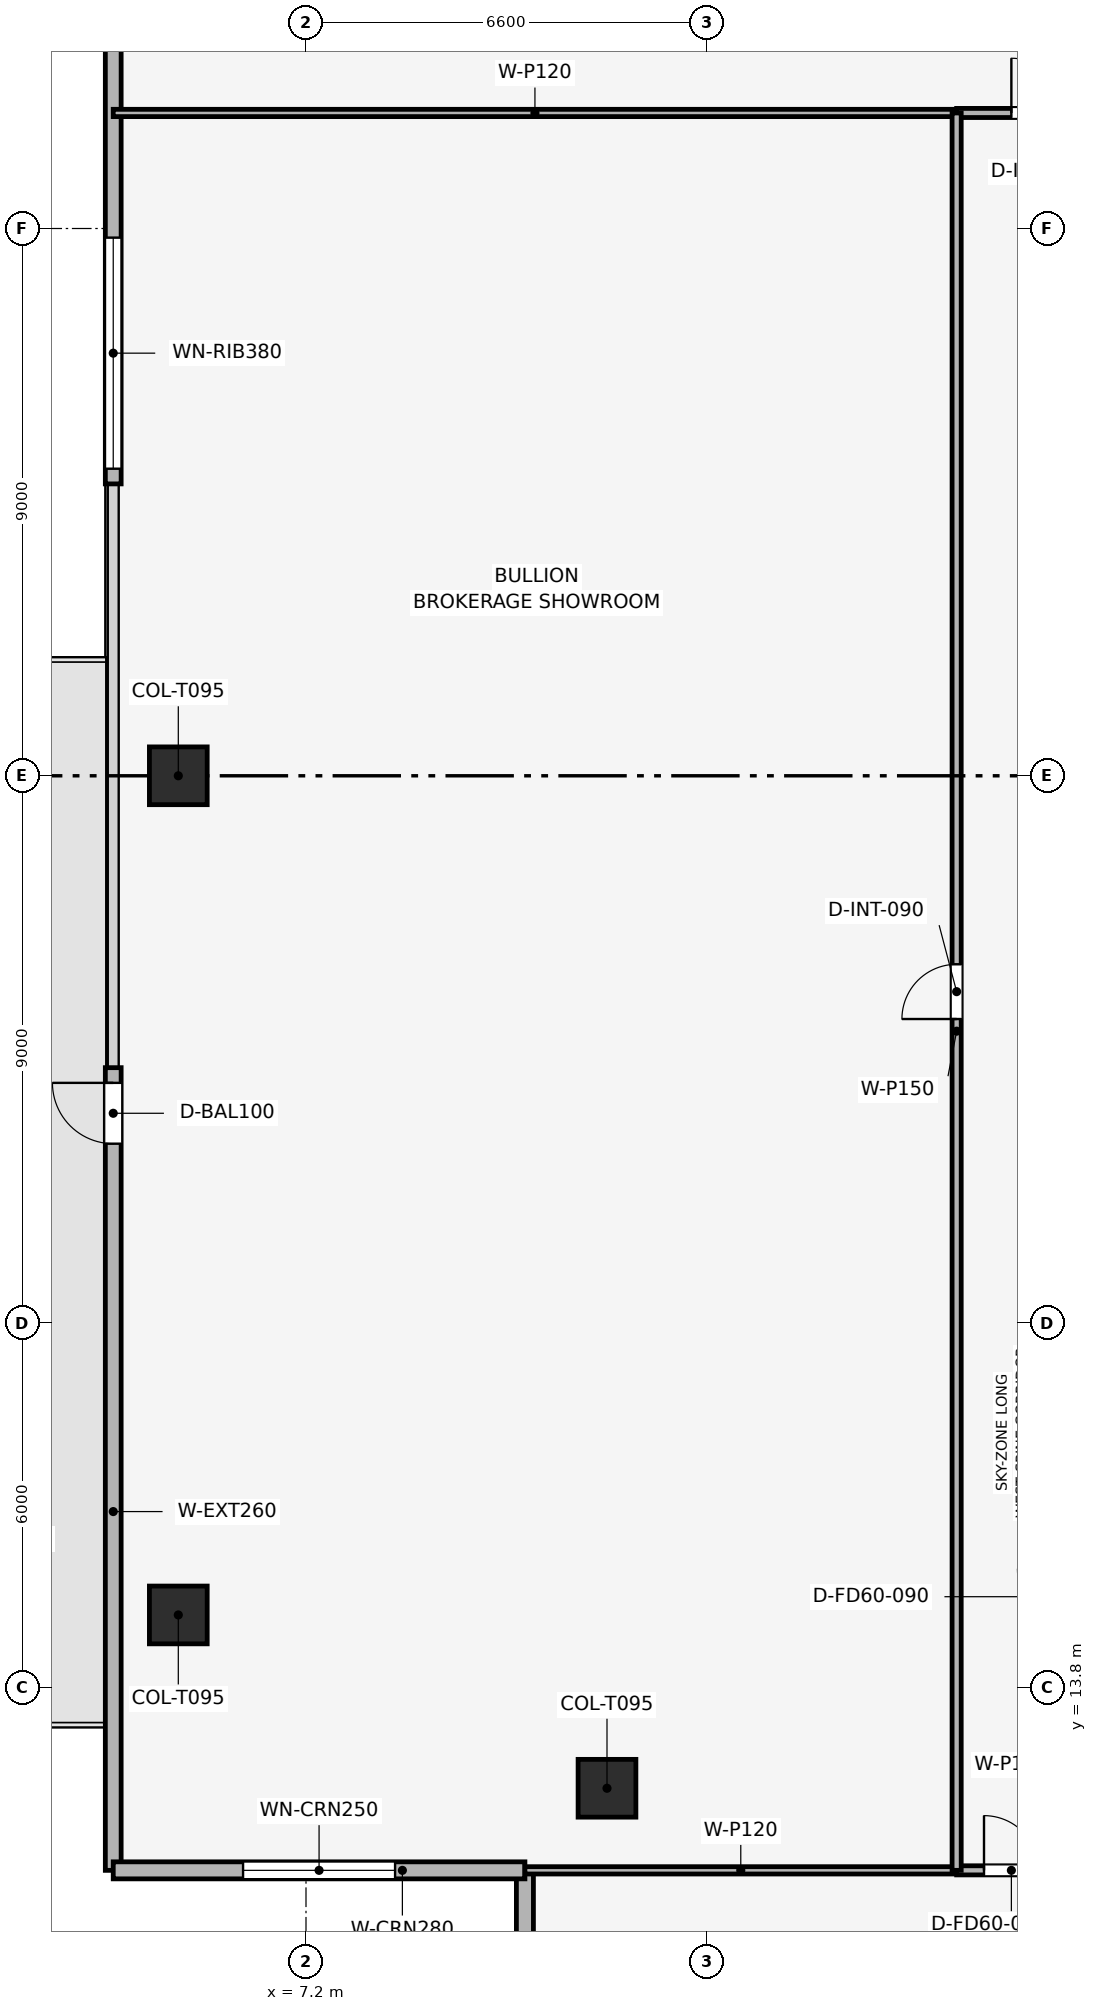
"""IFC4 building model, lengths in metres.
Left out: names, types, materials, properties, quantities, classifications, styles, units other than length and angle.
Written with IfcOpenShell. Run it as: python <this file> out.ifc"""

import sys

from ifc_helpers import new_model, si_unit, direction, frame, frame_2d, origin, origin_2d, place, context, subcontext, project, spatial, rectangle, extrude, element, fill, save


model = new_model("IFC4")
c1 = context("Model", 3, precision=1e-05, world=origin(), true_north=direction((0.0, 1.0)))
c2 = subcontext(c1, "Body", "Model", "MODEL_VIEW")
j1 = project(units=[si_unit("LENGTHUNIT", "METRE"), si_unit("PLANEANGLEUNIT", "RADIAN")], contexts=[c1])
p1 = place(None, origin())
s1 = spatial("IfcSite", under=j1, at=p1, CompositionType="ELEMENT")
p2 = place(p1, origin())
s2 = spatial("IfcBuilding", under=s1, at=p2, CompositionType="ELEMENT")
p3 = place(p2, frame((0.0, 0.0, 250.35)))
s3 = spatial("IfcBuildingStorey", under=s2, at=p3, CompositionType="ELEMENT", Elevation=250.35)
for number, where, z_axis, x_axis in (
    (1, (5.1, 28.8, 0.003), (0.0, 0.0, 1.0), (1.0, 0.0, 0.0)),
    (2, (5.1, 15.0, 0.003), (0.0, 0.0, 1.0), (1.0, 0.0, 0.0)),
    (3, (12.15, 12.15, 0.003), (0.0, 0.0, 1.0), (1.0, 0.0, 0.0)),
):
    element("IfcColumn", number, at=place(p3, frame(where, z_axis=z_axis, x_axis=x_axis)), inside=s3, PredefinedType="COLUMN", context=c2, shape_type="SweptSolid", body=[
        extrude(rectangle(XDim=0.95, YDim=0.95, at=origin_2d()), origin(), (0.0, 0.0, 1.0), 3.494),
    ])
p4 = place(p3, frame((4.03, 10.8, 0.0), z_axis=(0.0, 0.0, 1.0), x_axis=(0.0, 1.0, 0.0)))
e4 = element("IfcWall", 4, at=p4, inside=s3, PredefinedType="SOLIDWALL", context=c2, shape_type="SweptSolid", body=[
    extrude(rectangle(XDim=13.2, YDim=0.26, at=frame_2d((6.6, 0.0))), origin(), (0.0, 0.0, 1.0), 3.5),
])
p5 = place(p4, frame((11.95, 0.0, 0.0)))
e5 = element("IfcOpeningElement", 5, at=p5, cuts=e4, PredefinedType="OPENING", context=c2, shape_type="SweptSolid", body=[
    extrude(rectangle(XDim=1.0, YDim=2.2, at=frame_2d((0.5, 1.1))), frame((0.0, 0.14, 0.0), z_axis=(0.0, -1.0, 0.0), x_axis=(1.0, 0.0, 0.0)), (0.0, 0.0, 1.0), 0.28),
])
p6 = place(p3, frame((4.03, 33.6, 0.0), z_axis=(0.0, 0.0, 1.0), x_axis=(0.0, 1.0, 0.0)))
e6 = element("IfcWall", 6, at=p6, inside=s3, PredefinedType="SOLIDWALL", context=c2, shape_type="SweptSolid", body=[
    extrude(rectangle(XDim=13.2, YDim=0.26, at=frame_2d((6.6, 0.0))), origin(), (0.0, 0.0, 1.0), 3.5),
])
p7 = place(p6, frame((0.25, 0.0, 0.9)))
e7 = element("IfcOpeningElement", 7, at=p7, cuts=e6, PredefinedType="OPENING", context=c2, shape_type="SweptSolid", body=[
    extrude(rectangle(XDim=3.8, YDim=1.9, at=frame_2d((1.9, 0.95))), frame((0.0, 0.14, 0.0), z_axis=(0.0, -1.0, 0.0), x_axis=(1.0, 0.0, 0.0)), (0.0, 0.0, 1.0), 0.28),
])
p8 = place(p3, frame((10.8, 4.03, 0.0), z_axis=(0.0, 0.0, 1.0), x_axis=(0.0, 1.0, 0.0)))
e8 = element("IfcWall", 8, at=p8, inside=s3, PredefinedType="SOLIDWALL", context=c2, shape_type="SweptSolid", body=[
    extrude(rectangle(XDim=6.77, YDim=0.28, at=frame_2d((3.385, 0.0))), origin(), (0.0, 0.0, 1.0), 3.5),
])
p9 = place(p8, frame((2.135, 0.0, 0.9)))
e9 = element("IfcOpeningElement", 9, at=p9, cuts=e8, PredefinedType="OPENING", context=c2, shape_type="SweptSolid", body=[
    extrude(rectangle(XDim=2.5, YDim=1.9, at=frame_2d((1.25, 0.95))), frame((0.0, 0.15, 0.0), z_axis=(0.0, -1.0, 0.0), x_axis=(1.0, 0.0, 0.0)), (0.0, 0.0, 1.0), 0.3),
])
p10 = place(p3, frame((10.8, 10.8, 0.0), z_axis=(0.0, 0.0, 1.0), x_axis=(-1.0, 0.0, 0.0)))
e10 = element("IfcWall", 10, at=p10, inside=s3, PredefinedType="SOLIDWALL", context=c2, shape_type="SweptSolid", body=[
    extrude(rectangle(XDim=6.77, YDim=0.28, at=frame_2d((3.385, 0.0))), origin(), (0.0, 0.0, 1.0), 3.5),
])
p11 = place(p10, frame((2.135, 0.0, 0.9)))
e11 = element("IfcOpeningElement", 11, at=p11, cuts=e10, PredefinedType="OPENING", context=c2, shape_type="SweptSolid", body=[
    extrude(rectangle(XDim=2.5, YDim=1.9, at=frame_2d((1.25, 0.95))), frame((0.0, 0.15, 0.0), z_axis=(0.0, -1.0, 0.0), x_axis=(1.0, 0.0, 0.0)), (0.0, 0.0, 1.0), 0.3),
])
p12 = place(p3, frame((10.8, 10.8, 0.0), z_axis=(0.0, 0.0, 1.0), x_axis=(1.0, 0.0, 0.0)))
e12 = element("IfcWall", 12, at=p12, inside=s3, PredefinedType="PARTITIONING", context=c2, shape_type="SweptSolid", body=[
    extrude(rectangle(XDim=7.1, YDim=0.12, at=frame_2d((3.55, 0.0))), origin(), (0.0, 0.0, 1.0), 3.085),
])
p13 = place(p3, frame((17.9, 10.8, 0.0), z_axis=(0.0, 0.0, 1.0), x_axis=(1.0, 0.0, 0.0)))
e13 = element("IfcWall", 13, at=p13, inside=s3, PredefinedType="PARTITIONING", context=c2, shape_type="SweptSolid", body=[
    extrude(rectangle(XDim=1.9, YDim=0.15, at=frame_2d((0.95, 0.0))), origin(), (0.0, 0.0, 1.0), 3.5),
])
p14 = place(p13, frame((0.45, 0.0, 0.0)))
e14 = element("IfcOpeningElement", 14, at=p14, cuts=e13, PredefinedType="OPENING", context=c2, shape_type="SweptSolid", body=[
    extrude(rectangle(XDim=0.9, YDim=2.1, at=frame_2d((0.45, 1.05))), frame((0.0, 0.085, 0.0), z_axis=(0.0, -1.0, 0.0), x_axis=(1.0, 0.0, 0.0)), (0.0, 0.0, 1.0), 0.17),
])
p15 = place(p3, frame((4.03, 39.7, 0.0), z_axis=(0.0, 0.0, 1.0), x_axis=(1.0, 0.0, 0.0)))
e15 = element("IfcWall", 15, at=p15, inside=s3, PredefinedType="PARTITIONING", context=c2, shape_type="SweptSolid", body=[
    extrude(rectangle(XDim=13.87, YDim=0.12, at=frame_2d((6.935, 0.0))), origin(), (0.0, 0.0, 1.0), 3.085),
])
p16 = place(p3, frame((17.9, 39.7, 0.0), z_axis=(0.0, 0.0, 1.0), x_axis=(1.0, 0.0, 0.0)))
e16 = element("IfcWall", 16, at=p16, inside=s3, PredefinedType="PARTITIONING", context=c2, shape_type="SweptSolid", body=[
    extrude(rectangle(XDim=21.8, YDim=0.15, at=frame_2d((10.9, 0.0))), origin(), (0.0, 0.0, 1.0), 3.085),
])
p17 = place(p16, frame((0.9, 0.0, 0.0)))
e17 = element("IfcOpeningElement", 17, at=p17, cuts=e16, PredefinedType="OPENING", context=c2, shape_type="SweptSolid", body=[
    extrude(rectangle(XDim=0.9, YDim=2.1, at=frame_2d((0.45, 1.05))), frame((0.0, 0.085, 0.0), z_axis=(0.0, -1.0, 0.0), x_axis=(1.0, 0.0, 0.0)), (0.0, 0.0, 1.0), 0.17),
])
p18 = place(p16, frame((3.65, 0.0, 0.0)))
e18 = element("IfcOpeningElement", 18, at=p18, cuts=e16, PredefinedType="OPENING", context=c2, shape_type="SweptSolid", body=[
    extrude(rectangle(XDim=0.9, YDim=2.1, at=frame_2d((0.45, 1.05))), frame((0.0, 0.085, 0.0), z_axis=(0.0, -1.0, 0.0), x_axis=(1.0, 0.0, 0.0)), (0.0, 0.0, 1.0), 0.17),
])
p19 = place(p16, frame((6.55, 0.0, 0.0)))
e19 = element("IfcOpeningElement", 19, at=p19, cuts=e16, PredefinedType="OPENING", context=c2, shape_type="SweptSolid", body=[
    extrude(rectangle(XDim=0.9, YDim=2.1, at=frame_2d((0.45, 1.05))), frame((0.0, 0.085, 0.0), z_axis=(0.0, -1.0, 0.0), x_axis=(1.0, 0.0, 0.0)), (0.0, 0.0, 1.0), 0.17),
])
p20 = place(p16, frame((9.3, 0.0, 0.0)))
e20 = element("IfcOpeningElement", 20, at=p20, cuts=e16, PredefinedType="OPENING", context=c2, shape_type="SweptSolid", body=[
    extrude(rectangle(XDim=0.95, YDim=2.1, at=frame_2d((0.475, 1.05))), frame((0.0, 0.085, 0.0), z_axis=(0.0, -1.0, 0.0), x_axis=(1.0, 0.0, 0.0)), (0.0, 0.0, 1.0), 0.17),
])
p21 = place(p16, frame((16.0, 0.0, 0.0)))
e21 = element("IfcOpeningElement", 21, at=p21, cuts=e16, PredefinedType="OPENING", context=c2, shape_type="SweptSolid", body=[
    extrude(rectangle(XDim=0.9, YDim=2.1, at=frame_2d((0.45, 1.05))), frame((0.0, 0.085, 0.0), z_axis=(0.0, -1.0, 0.0), x_axis=(1.0, 0.0, 0.0)), (0.0, 0.0, 1.0), 0.17),
])
p22 = place(p3, frame((17.9, 10.8, 0.0), z_axis=(0.0, 0.0, 1.0), x_axis=(0.0, 1.0, 0.0)))
e22 = element("IfcWall", 22, at=p22, inside=s3, PredefinedType="PARTITIONING", context=c2, shape_type="SweptSolid", body=[
    extrude(rectangle(XDim=28.9, YDim=0.15, at=frame_2d((14.45, 0.0))), origin(), (0.0, 0.0, 1.0), 3.085),
])
p23 = place(p22, frame((14.0, 0.0, 0.0)))
e23 = element("IfcOpeningElement", 23, at=p23, cuts=e22, PredefinedType="OPENING", context=c2, shape_type="SweptSolid", body=[
    extrude(rectangle(XDim=0.9, YDim=2.1, at=frame_2d((0.45, 1.05))), frame((0.0, 0.085, 0.0), z_axis=(0.0, -1.0, 0.0), x_axis=(1.0, 0.0, 0.0)), (0.0, 0.0, 1.0), 0.17),
])
p24 = place(p5, origin())
e24 = element("IfcDoor", 24, at=p24, inside=s3, OperationType="SINGLE_SWING_RIGHT", PredefinedType="DOOR", context=c2, shape_type="SweptSolid", body=[
    extrude(rectangle(XDim=1.0, YDim=2.2, at=frame_2d((0.5, 1.1))), frame((0.0, 0.025, 0.0), z_axis=(0.0, -1.0, 0.0), x_axis=(1.0, 0.0, 0.0)), (0.0, 0.0, 1.0), 0.05),
])
fill(e5, e24)
p25 = place(p7, origin())
e25 = element("IfcWindow", 25, at=p25, inside=s3, PartitioningType="SINGLE_PANEL", PredefinedType="WINDOW", context=c2, shape_type="SweptSolid", body=[
    extrude(rectangle(XDim=3.8, YDim=1.9, at=frame_2d((1.9, 0.95))), frame((0.0, 0.03, 0.0), z_axis=(0.0, -1.0, 0.0), x_axis=(1.0, 0.0, 0.0)), (0.0, 0.0, 1.0), 0.06),
])
fill(e7, e25)
p26 = place(p11, origin())
e26 = element("IfcWindow", 26, at=p26, inside=s3, PartitioningType="SINGLE_PANEL", PredefinedType="WINDOW", context=c2, shape_type="SweptSolid", body=[
    extrude(rectangle(XDim=2.5, YDim=1.9, at=frame_2d((1.25, 0.95))), frame((0.0, 0.03, 0.0), z_axis=(0.0, -1.0, 0.0), x_axis=(1.0, 0.0, 0.0)), (0.0, 0.0, 1.0), 0.06),
])
fill(e11, e26)
p27 = place(p14, origin())
e27 = element("IfcDoor", 27, at=p27, inside=s3, OperationType="SINGLE_SWING_LEFT", PredefinedType="DOOR", context=c2, shape_type="SweptSolid", body=[
    extrude(rectangle(XDim=0.9, YDim=2.1, at=frame_2d((0.45, 1.05))), frame((0.0, 0.025, 0.0), z_axis=(0.0, -1.0, 0.0), x_axis=(1.0, 0.0, 0.0)), (0.0, 0.0, 1.0), 0.05),
])
fill(e14, e27)
p28 = place(p17, origin())
e28 = element("IfcDoor", 28, at=p28, inside=s3, OperationType="SINGLE_SWING_LEFT", PredefinedType="DOOR", context=c2, shape_type="SweptSolid", body=[
    extrude(rectangle(XDim=0.9, YDim=2.1, at=frame_2d((0.45, 1.05))), frame((0.0, 0.025, 0.0), z_axis=(0.0, -1.0, 0.0), x_axis=(1.0, 0.0, 0.0)), (0.0, 0.0, 1.0), 0.05),
])
fill(e17, e28)
p29 = place(p23, origin())
e29 = element("IfcDoor", 29, at=p29, inside=s3, OperationType="SINGLE_SWING_LEFT", PredefinedType="DOOR", context=c2, shape_type="SweptSolid", body=[
    extrude(rectangle(XDim=0.9, YDim=2.1, at=frame_2d((0.45, 1.05))), frame((0.0, 0.025, 0.0), z_axis=(0.0, -1.0, 0.0), x_axis=(1.0, 0.0, 0.0)), (0.0, 0.0, 1.0), 0.05),
])
fill(e23, e29)
save(model, sys.argv[1])
